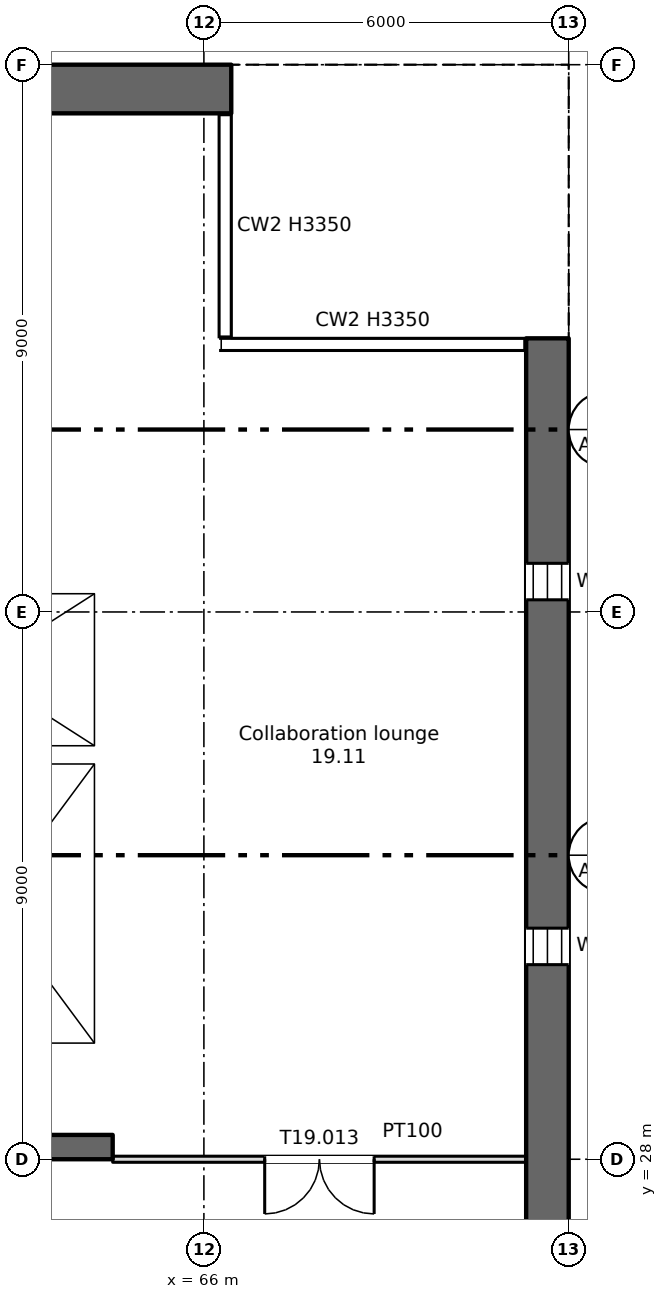
"""IFC4 building model, lengths in metres.
Left out: names, types, materials, properties, quantities, classifications, styles, units other than length and angle.
Written with IfcOpenShell. Run it as: python <this file> out.ifc"""

import sys

from ifc_helpers import new_model, si_unit, direction, frame, frame_2d, origin, place, context, subcontext, project, spatial, rectangle, extrude, element, fill, save


model = new_model("IFC4")
c1 = context("Model", 3, precision=1e-05, world=origin(), true_north=direction((0.0, 1.0)))
c2 = subcontext(c1, "Body", "Model", "MODEL_VIEW")
j1 = project(units=[si_unit("LENGTHUNIT", "METRE"), si_unit("PLANEANGLEUNIT", "RADIAN")], contexts=[c1])
p1 = place(None, origin())
s1 = spatial("IfcSite", under=j1, at=p1, CompositionType="ELEMENT")
p2 = place(p1, origin())
s2 = spatial("IfcBuilding", under=s1, at=p2, CompositionType="ELEMENT")
p3 = place(p2, frame((0.0, 0.0, 121.25)))
s3 = spatial("IfcBuildingStorey", under=s2, at=p3, CompositionType="ELEMENT", Elevation=121.25)
p4 = place(p3, frame((71.65, 6.0, 0.0), z_axis=(0.0, 0.0, 1.0), x_axis=(0.0, 1.0, 0.0)))
e1 = element("IfcWall", 1, at=p4, inside=s3, PredefinedType="SHEAR", context=c2, shape_type="SweptSolid", body=[
    extrude(rectangle(XDim=35.5, YDim=0.7, at=frame_2d((17.75, 0.0))), origin(), (0.0, 0.0, 1.0), 3.35),
])
p5 = place(p4, frame((1.2, 0.0, 0.6)))
e2 = element("IfcOpeningElement", 2, at=p5, cuts=e1, PredefinedType="OPENING", context=c2, shape_type="SweptSolid", body=[
    extrude(rectangle(XDim=0.6, YDim=2.4, at=frame_2d((0.3, 1.2))), frame((0.0, 0.36, 0.0), z_axis=(0.0, -1.0, 0.0), x_axis=(1.0, 0.0, 0.0)), (0.0, 0.0, 1.0), 0.72),
])
p6 = place(p4, frame((7.2, 0.0, 0.6)))
e3 = element("IfcOpeningElement", 3, at=p6, cuts=e1, PredefinedType="OPENING", context=c2, shape_type="SweptSolid", body=[
    extrude(rectangle(XDim=0.6, YDim=2.4, at=frame_2d((0.3, 1.2))), frame((0.0, 0.36, 0.0), z_axis=(0.0, -1.0, 0.0), x_axis=(1.0, 0.0, 0.0)), (0.0, 0.0, 1.0), 0.72),
])
p7 = place(p4, frame((13.2, 0.0, 0.6)))
e4 = element("IfcOpeningElement", 4, at=p7, cuts=e1, PredefinedType="OPENING", context=c2, shape_type="SweptSolid", body=[
    extrude(rectangle(XDim=0.6, YDim=2.4, at=frame_2d((0.3, 1.2))), frame((0.0, 0.36, 0.0), z_axis=(0.0, -1.0, 0.0), x_axis=(1.0, 0.0, 0.0)), (0.0, 0.0, 1.0), 0.72),
])
p8 = place(p4, frame((19.2, 0.0, 0.6)))
e5 = element("IfcOpeningElement", 5, at=p8, cuts=e1, PredefinedType="OPENING", context=c2, shape_type="SweptSolid", body=[
    extrude(rectangle(XDim=0.6, YDim=2.4, at=frame_2d((0.3, 1.2))), frame((0.0, 0.36, 0.0), z_axis=(0.0, -1.0, 0.0), x_axis=(1.0, 0.0, 0.0)), (0.0, 0.0, 1.0), 0.72),
])
p9 = place(p4, frame((25.2, 0.0, 0.6)))
e6 = element("IfcOpeningElement", 6, at=p9, cuts=e1, PredefinedType="OPENING", context=c2, shape_type="SweptSolid", body=[
    extrude(rectangle(XDim=0.6, YDim=2.4, at=frame_2d((0.3, 1.2))), frame((0.0, 0.36, 0.0), z_axis=(0.0, -1.0, 0.0), x_axis=(1.0, 0.0, 0.0)), (0.0, 0.0, 1.0), 0.72),
])
p10 = place(p4, frame((31.2, 0.0, 0.6)))
e7 = element("IfcOpeningElement", 7, at=p10, cuts=e1, PredefinedType="OPENING", context=c2, shape_type="SweptSolid", body=[
    extrude(rectangle(XDim=0.6, YDim=2.4, at=frame_2d((0.3, 1.2))), frame((0.0, 0.36, 0.0), z_axis=(0.0, -1.0, 0.0), x_axis=(1.0, 0.0, 0.0)), (0.0, 0.0, 1.0), 0.72),
])
p11 = place(p3, frame((5.55, 45.6, 0.0), z_axis=(0.0, 0.0, 1.0), x_axis=(1.0, 0.0, 0.0)))
e8 = element("IfcWall", 8, at=p11, inside=s3, PredefinedType="SHEAR", context=c2, shape_type="SweptSolid", body=[
    extrude(rectangle(XDim=60.9, YDim=0.8, at=frame_2d((30.45, 0.0))), origin(), (0.0, 0.0, 1.0), 3.35),
])
p12 = place(p11, frame((7.2, 0.0, 0.6)))
e9 = element("IfcOpeningElement", 9, at=p12, cuts=e8, PredefinedType="OPENING", context=c2, shape_type="SweptSolid", body=[
    extrude(rectangle(XDim=0.6, YDim=2.4, at=frame_2d((0.3, 1.2))), frame((0.0, 0.41, 0.0), z_axis=(0.0, -1.0, 0.0), x_axis=(1.0, 0.0, 0.0)), (0.0, 0.0, 1.0), 0.82),
])
p13 = place(p3, frame((6.7, 28.2, 0.0), z_axis=(0.0, 0.0, 1.0), x_axis=(1.0, 0.0, 0.0)))
e10 = element("IfcWall", 10, at=p13, inside=s3, PredefinedType="SHEAR", context=c2, shape_type="SweptSolid", body=[
    extrude(rectangle(XDim=57.8, YDim=0.4, at=frame_2d((28.9, 0.0))), origin(), (0.0, 0.0, 1.0), 3.35),
])
p14 = place(p13, frame((12.062, 0.0, 0.0)))
e11 = element("IfcOpeningElement", 11, at=p14, cuts=e10, PredefinedType="OPENING", context=c2, shape_type="SweptSolid", body=[
    extrude(rectangle(XDim=0.9, YDim=2.1, at=frame_2d((0.45, 1.05))), frame((0.0, 0.21, 0.0), z_axis=(0.0, -1.0, 0.0), x_axis=(1.0, 0.0, 0.0)), (0.0, 0.0, 1.0), 0.42),
])
p15 = place(p13, frame((14.637, 0.0, 0.0)))
e12 = element("IfcOpeningElement", 12, at=p15, cuts=e10, PredefinedType="OPENING", context=c2, shape_type="SweptSolid", body=[
    extrude(rectangle(XDim=0.9, YDim=2.1, at=frame_2d((0.45, 1.05))), frame((0.0, 0.21, 0.0), z_axis=(0.0, -1.0, 0.0), x_axis=(1.0, 0.0, 0.0)), (0.0, 0.0, 1.0), 0.42),
])
p16 = place(p13, frame((49.062, 0.0, 0.0)))
e13 = element("IfcOpeningElement", 13, at=p16, cuts=e10, PredefinedType="OPENING", context=c2, shape_type="SweptSolid", body=[
    extrude(rectangle(XDim=0.9, YDim=2.1, at=frame_2d((0.45, 1.05))), frame((0.0, 0.21, 0.0), z_axis=(0.0, -1.0, 0.0), x_axis=(1.0, 0.0, 0.0)), (0.0, 0.0, 1.0), 0.42),
])
p17 = place(p13, frame((51.637, 0.0, 0.0)))
e14 = element("IfcOpeningElement", 14, at=p17, cuts=e10, PredefinedType="OPENING", context=c2, shape_type="SweptSolid", body=[
    extrude(rectangle(XDim=0.9, YDim=2.1, at=frame_2d((0.45, 1.05))), frame((0.0, 0.21, 0.0), z_axis=(0.0, -1.0, 0.0), x_axis=(1.0, 0.0, 0.0)), (0.0, 0.0, 1.0), 0.42),
])
p18 = place(p13, frame((1.35, 0.0, 0.0)))
e15 = element("IfcOpeningElement", 15, at=p18, cuts=e10, PredefinedType="OPENING", context=c2, shape_type="SweptSolid", body=[
    extrude(rectangle(XDim=0.9, YDim=2.1, at=frame_2d((0.45, 1.05))), frame((0.0, 0.21, 0.0), z_axis=(0.0, -1.0, 0.0), x_axis=(1.0, 0.0, 0.0)), (0.0, 0.0, 1.0), 0.42),
])
p19 = place(p13, frame((4.7, 0.0, 0.0)))
e16 = element("IfcOpeningElement", 16, at=p19, cuts=e10, PredefinedType="OPENING", context=c2, shape_type="SweptSolid", body=[
    extrude(rectangle(XDim=1.2, YDim=2.1, at=frame_2d((0.6, 1.05))), frame((0.0, 0.21, 0.0), z_axis=(0.0, -1.0, 0.0), x_axis=(1.0, 0.0, 0.0)), (0.0, 0.0, 1.0), 0.42),
])
p20 = place(p13, frame((31.7, 0.0, 0.0)))
e17 = element("IfcOpeningElement", 17, at=p20, cuts=e10, PredefinedType="OPENING", context=c2, shape_type="SweptSolid", body=[
    extrude(rectangle(XDim=1.2, YDim=2.1, at=frame_2d((0.6, 1.05))), frame((0.0, 0.21, 0.0), z_axis=(0.0, -1.0, 0.0), x_axis=(1.0, 0.0, 0.0)), (0.0, 0.0, 1.0), 0.42),
])
p21 = place(p13, frame((55.2, 0.0, 0.0)))
e18 = element("IfcOpeningElement", 18, at=p21, cuts=e10, PredefinedType="OPENING", context=c2, shape_type="SweptSolid", body=[
    extrude(rectangle(XDim=1.2, YDim=2.1, at=frame_2d((0.6, 1.05))), frame((0.0, 0.21, 0.0), z_axis=(0.0, -1.0, 0.0), x_axis=(1.0, 0.0, 0.0)), (0.0, 0.0, 1.0), 0.42),
])
p22 = place(p13, frame((21.7, 0.0, 0.0)))
e19 = element("IfcOpeningElement", 19, at=p22, cuts=e10, PredefinedType="OPENING", context=c2, shape_type="SweptSolid", body=[
    extrude(rectangle(XDim=1.2, YDim=2.1, at=frame_2d((0.6, 1.05))), frame((0.0, 0.21, 0.0), z_axis=(0.0, -1.0, 0.0), x_axis=(1.0, 0.0, 0.0)), (0.0, 0.0, 1.0), 0.42),
])
p23 = place(p13, frame((41.7, 0.0, 0.0)))
e20 = element("IfcOpeningElement", 20, at=p23, cuts=e10, PredefinedType="OPENING", context=c2, shape_type="SweptSolid", body=[
    extrude(rectangle(XDim=1.2, YDim=2.1, at=frame_2d((0.6, 1.05))), frame((0.0, 0.21, 0.0), z_axis=(0.0, -1.0, 0.0), x_axis=(1.0, 0.0, 0.0)), (0.0, 0.0, 1.0), 0.42),
])
p24 = place(p13, frame((24.85, 0.0, 0.0)))
e21 = element("IfcOpeningElement", 21, at=p24, cuts=e10, PredefinedType="OPENING", context=c2, shape_type="SweptSolid", body=[
    extrude(rectangle(XDim=2.4, YDim=2.1, at=frame_2d((1.2, 1.05))), frame((0.0, 0.21, 0.0), z_axis=(0.0, -1.0, 0.0), x_axis=(1.0, 0.0, 0.0)), (0.0, 0.0, 1.0), 0.42),
])
p25 = place(p13, frame((37.35, 0.0, 0.0)))
e22 = element("IfcOpeningElement", 22, at=p25, cuts=e10, PredefinedType="OPENING", context=c2, shape_type="SweptSolid", body=[
    extrude(rectangle(XDim=2.4, YDim=2.1, at=frame_2d((1.2, 1.05))), frame((0.0, 0.21, 0.0), z_axis=(0.0, -1.0, 0.0), x_axis=(1.0, 0.0, 0.0)), (0.0, 0.0, 1.0), 0.42),
])
p26 = place(p13, frame((7.95, 0.0, 0.0)))
e23 = element("IfcOpeningElement", 23, at=p26, cuts=e10, PredefinedType="OPENING", context=c2, shape_type="SweptSolid", body=[
    extrude(rectangle(XDim=2.4, YDim=2.1, at=frame_2d((1.2, 1.05))), frame((0.0, 0.21, 0.0), z_axis=(0.0, -1.0, 0.0), x_axis=(1.0, 0.0, 0.0)), (0.0, 0.0, 1.0), 0.42),
])
p27 = place(p13, frame((28.85, 0.0, 0.0)))
e24 = element("IfcOpeningElement", 24, at=p27, cuts=e10, PredefinedType="OPENING", context=c2, shape_type="SweptSolid", body=[
    extrude(rectangle(XDim=0.9, YDim=2.1, at=frame_2d((0.45, 1.05))), frame((0.0, 0.21, 0.0), z_axis=(0.0, -1.0, 0.0), x_axis=(1.0, 0.0, 0.0)), (0.0, 0.0, 1.0), 0.42),
])
p28 = place(p13, frame((34.85, 0.0, 0.0)))
e25 = element("IfcOpeningElement", 25, at=p28, cuts=e10, PredefinedType="OPENING", context=c2, shape_type="SweptSolid", body=[
    extrude(rectangle(XDim=0.9, YDim=2.1, at=frame_2d((0.45, 1.05))), frame((0.0, 0.21, 0.0), z_axis=(0.0, -1.0, 0.0), x_axis=(1.0, 0.0, 0.0)), (0.0, 0.0, 1.0), 0.42),
])
p29 = place(p3, frame((64.35, 34.8, 0.0), z_axis=(0.0, 0.0, 1.0), x_axis=(0.0, 1.0, 0.0)))
e26 = element("IfcWall", 26, at=p29, inside=s3, PredefinedType="SHEAR", context=c2, shape_type="SweptSolid", body=[
    extrude(rectangle(XDim=10.4, YDim=0.3, at=frame_2d((5.2, 0.0))), origin(), (0.0, 0.0, 1.0), 3.35),
])
p30 = place(p3, frame((64.35, 28.4, 0.0), z_axis=(0.0, 0.0, 1.0), x_axis=(0.0, 1.0, 0.0)))
e27 = element("IfcWall", 27, at=p30, inside=s3, PredefinedType="SHEAR", context=c2, shape_type="SweptSolid", body=[
    extrude(rectangle(XDim=6.1, YDim=0.3, at=frame_2d((3.05, 0.0))), origin(), (0.0, 0.0, 1.0), 3.35),
])
p31 = place(p3, frame((60.3, 34.65, 0.0), z_axis=(0.0, 0.0, 1.0), x_axis=(1.0, 0.0, 0.0)))
e28 = element("IfcWall", 28, at=p31, inside=s3, PredefinedType="SHEAR", context=c2, shape_type="SweptSolid", body=[
    extrude(rectangle(XDim=4.2, YDim=0.3, at=frame_2d((2.1, 0.0))), origin(), (0.0, 0.0, 1.0), 3.35),
])
p32 = place(p3, frame((60.3, 37.45, 0.0), z_axis=(0.0, 0.0, 1.0), x_axis=(1.0, 0.0, 0.0)))
e29 = element("IfcWall", 29, at=p32, inside=s3, PredefinedType="SHEAR", context=c2, shape_type="SweptSolid", body=[
    extrude(rectangle(XDim=3.9, YDim=0.3, at=frame_2d((1.95, 0.0))), origin(), (0.0, 0.0, 1.0), 3.35),
])
p33 = place(p32, frame((1.4, 0.0, 0.0)))
e30 = element("IfcOpeningElement", 30, at=p33, cuts=e29, PredefinedType="OPENING", context=c2, shape_type="SweptSolid", body=[
    extrude(rectangle(XDim=1.1, YDim=2.1, at=frame_2d((0.55, 1.05))), frame((0.0, 0.16, 0.0), z_axis=(0.0, -1.0, 0.0), x_axis=(1.0, 0.0, 0.0)), (0.0, 0.0, 1.0), 0.32),
])
p34 = place(p3, frame((64.5, 28.0, 0.0), z_axis=(0.0, 0.0, 1.0), x_axis=(1.0, 0.0, 0.0)))
e31 = element("IfcWall", 31, at=p34, inside=s3, PredefinedType="PARTITIONING", context=c2, shape_type="SweptSolid", body=[
    extrude(rectangle(XDim=6.8, YDim=0.1, at=frame_2d((3.4, 0.0))), origin(), (0.0, 0.0, 1.0), 3.35),
])
p35 = place(p34, frame((2.5, 0.0, 0.0)))
e32 = element("IfcOpeningElement", 32, at=p35, cuts=e31, PredefinedType="OPENING", context=c2, shape_type="SweptSolid", body=[
    extrude(rectangle(XDim=1.8, YDim=2.1, at=frame_2d((0.9, 1.05))), frame((0.0, 0.06, 0.0), z_axis=(0.0, -1.0, 0.0), x_axis=(1.0, 0.0, 0.0)), (0.0, 0.0, 1.0), 0.12),
])
p36 = place(p9, origin())
e33 = element("IfcWindow", 33, at=p36, inside=s3, PartitioningType="SINGLE_PANEL", PredefinedType="WINDOW", context=c2, shape_type="SweptSolid", body=[
    extrude(rectangle(XDim=0.6, YDim=2.4, at=frame_2d((0.3, 1.2))), frame((0.0, 0.03, 0.0), z_axis=(0.0, -1.0, 0.0), x_axis=(1.0, 0.0, 0.0)), (0.0, 0.0, 1.0), 0.06),
])
fill(e6, e33)
p37 = place(p10, origin())
e34 = element("IfcWindow", 34, at=p37, inside=s3, PartitioningType="SINGLE_PANEL", PredefinedType="WINDOW", context=c2, shape_type="SweptSolid", body=[
    extrude(rectangle(XDim=0.6, YDim=2.4, at=frame_2d((0.3, 1.2))), frame((0.0, 0.03, 0.0), z_axis=(0.0, -1.0, 0.0), x_axis=(1.0, 0.0, 0.0)), (0.0, 0.0, 1.0), 0.06),
])
fill(e7, e34)
p38 = place(p35, origin())
e35 = element("IfcDoor", 35, at=p38, inside=s3, OperationType="DOUBLE_DOOR_SINGLE_SWING", PredefinedType="DOOR", context=c2, shape_type="SweptSolid", body=[
    extrude(rectangle(XDim=1.8, YDim=2.1, at=frame_2d((0.9, 1.05))), frame((0.0, 0.025, 0.0), z_axis=(0.0, -1.0, 0.0), x_axis=(1.0, 0.0, 0.0)), (0.0, 0.0, 1.0), 0.05),
])
fill(e32, e35)
save(model, sys.argv[1])
